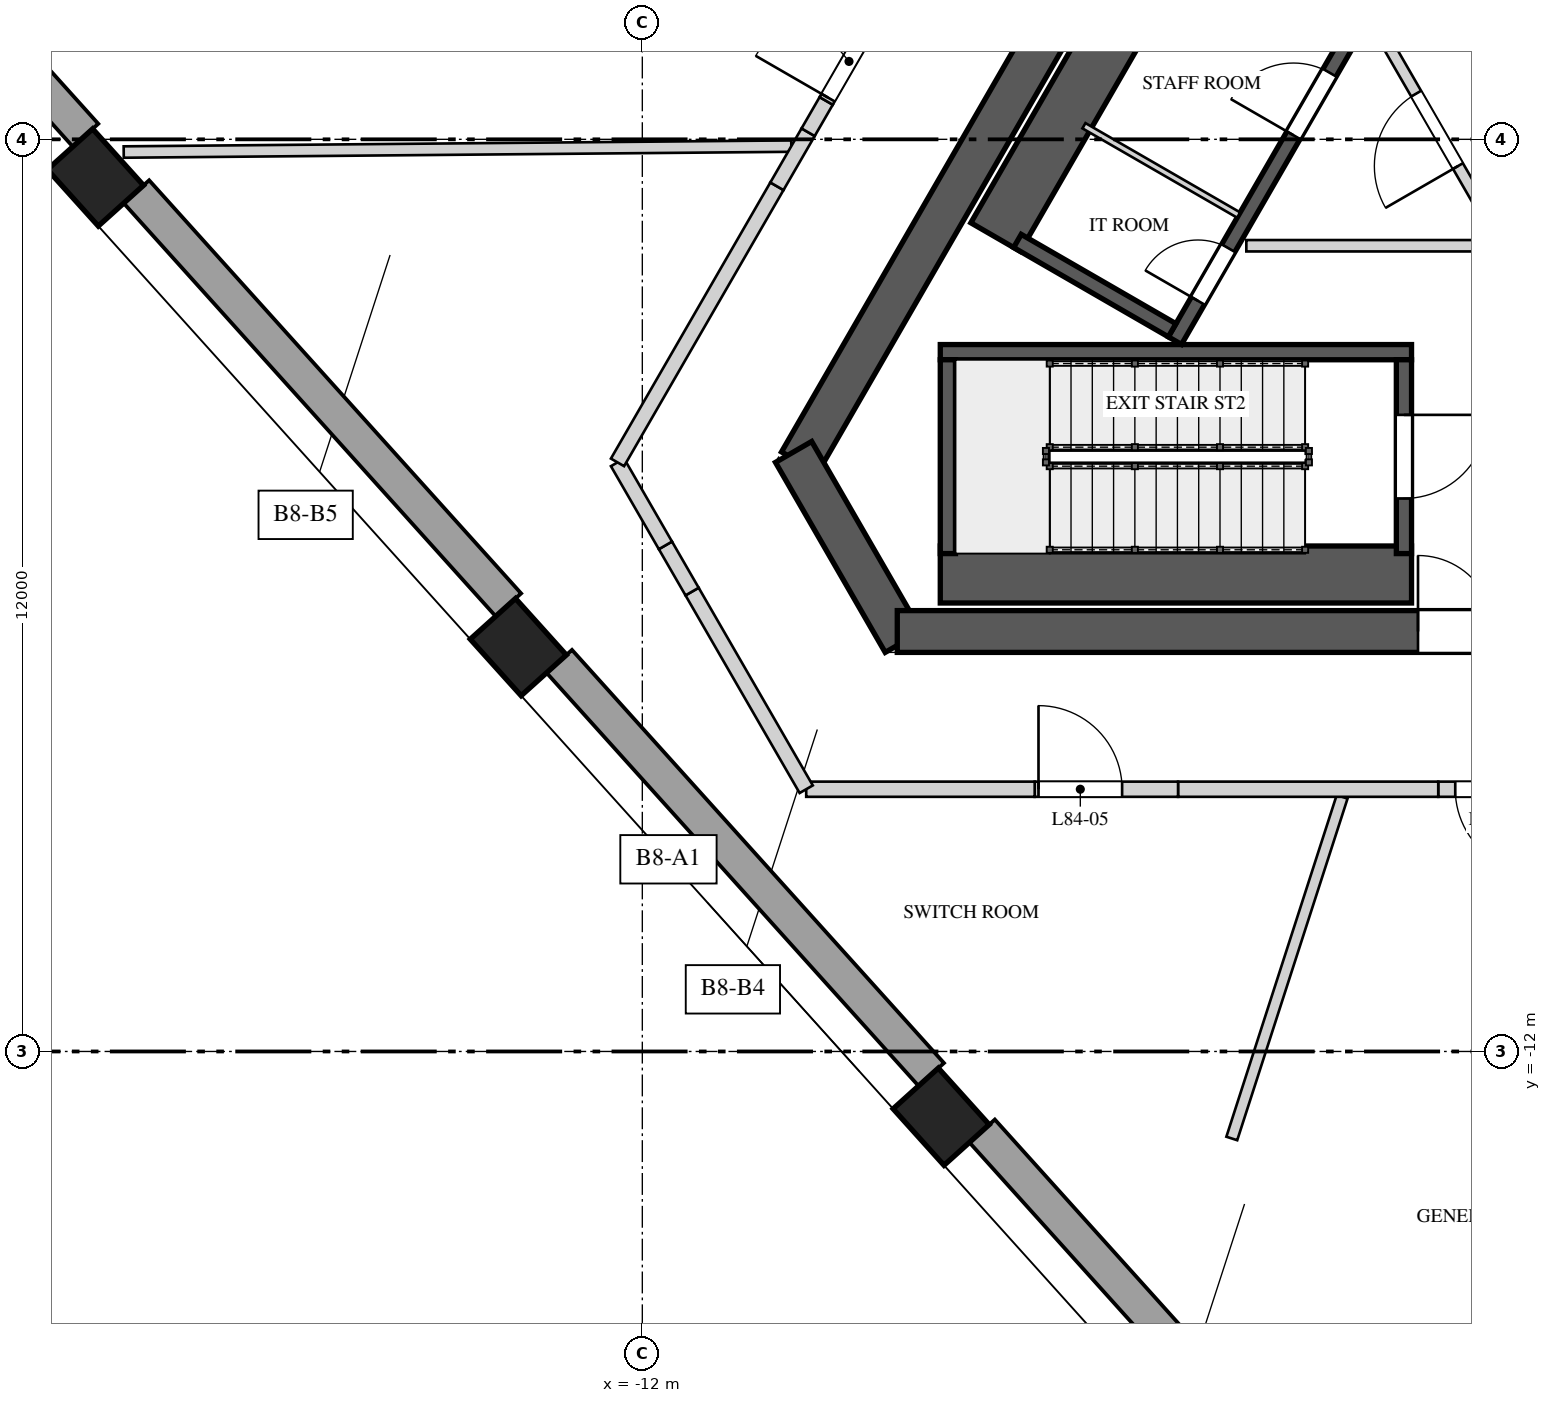
"""IFC4 building model, lengths in metres.
Left out: names, types, materials, properties, quantities, classifications, styles, units other than length and angle.
Written with IfcOpenShell. Run it as: python <this file> out.ifc"""

import sys

from ifc_helpers import new_model, si_unit, direction, frame, frame_2d, origin, origin_2d, place, context, subcontext, project, spatial, polyline, rectangle, outline, extrude, element, fill, save


model = new_model("IFC4")
c1 = context("Model", 3, precision=1e-05, world=origin(), true_north=direction((0.0, 1.0)))
c2 = subcontext(c1, "Body", "Model", "MODEL_VIEW")
j1 = project(units=[si_unit("LENGTHUNIT", "METRE"), si_unit("PLANEANGLEUNIT", "RADIAN")], contexts=[c1])
p1 = place(None, origin())
s1 = spatial("IfcSite", under=j1, at=p1, CompositionType="ELEMENT")
p2 = place(p1, origin())
s2 = spatial("IfcBuilding", under=s1, at=p2, CompositionType="ELEMENT")
p3 = place(p2, frame((0.0, 0.0, 365.9)))
s3 = spatial("IfcBuildingStorey", under=s2, at=p3, CompositionType="ELEMENT", Elevation=365.9)
p4 = place(p3, frame((-1.285, 10.725, 0.0), z_axis=(0.0, 0.0, 1.0), x_axis=(-0.499994590896, -0.86602852671, 0.0)))
e1 = element("IfcWall", 1, at=p4, inside=s3, PredefinedType="SHEAR", context=c2, shape_type="SweptSolid", body=[
    extrude(rectangle(XDim=17.292, YDim=0.55, at=frame_2d((8.646, 0.0))), origin(), (0.0, 0.0, 1.0), 4.5),
])
p5 = place(p4, frame((6.851, 0.0, 0.0)))
e2 = element("IfcOpeningElement", 2, at=p5, cuts=e1, PredefinedType="OPENING", context=c2, shape_type="SweptSolid", body=[
    extrude(rectangle(XDim=1.0, YDim=2.4, at=frame_2d((0.5, 1.2))), frame((0.0, 0.285, 0.0), z_axis=(0.0, -1.0, 0.0), x_axis=(1.0, 0.0, 0.0)), (0.0, 0.0, 1.0), 0.57),
])
p6 = place(p3, frame((-10.01, -4.113, 0.0), z_axis=(0.0, 0.0, 1.0), x_axis=(0.499995765644, -0.866027848477, 0.0)))
e3 = element("IfcWall", 3, at=p6, inside=s3, PredefinedType="SHEAR", context=c2, shape_type="SweptSolid", body=[
    extrude(rectangle(XDim=2.887, YDim=0.55, at=frame_2d((1.443, 0.0))), origin(), (0.0, 0.0, 1.0), 4.5),
])
p7 = place(p3, frame((-8.646, -6.475, 0.0), z_axis=(0.0, 0.0, 1.0), x_axis=(1.0, 0.0, 0.0)))
e4 = element("IfcWall", 4, at=p7, inside=s3, PredefinedType="SHEAR", context=c2, shape_type="SweptSolid", body=[
    extrude(rectangle(XDim=17.292, YDim=0.55, at=frame_2d((8.646, 0.0))), origin(), (0.0, 0.0, 1.0), 4.5),
])
p8 = place(p7, frame((6.851, 0.0, 0.0)))
e5 = element("IfcOpeningElement", 5, at=p8, cuts=e4, PredefinedType="OPENING", context=c2, shape_type="SweptSolid", body=[
    extrude(rectangle(XDim=1.0, YDim=2.4, at=frame_2d((0.5, 1.2))), frame((0.0, 0.285, 0.0), z_axis=(0.0, -1.0, 0.0), x_axis=(1.0, 0.0, 0.0)), (0.0, 0.0, 1.0), 0.57),
])
p9 = place(p7, frame((15.089, 0.0, 0.0)))
e6 = element("IfcOpeningElement", 6, at=p9, cuts=e4, PredefinedType="OPENING", context=c2, shape_type="SweptSolid", body=[
    extrude(rectangle(XDim=0.8, YDim=2.1, at=frame_2d((0.4, 1.05))), frame((0.0, 0.285, 0.0), z_axis=(0.0, -1.0, 0.0), x_axis=(1.0, 0.0, 0.0)), (0.0, 0.0, 1.0), 0.57),
])
for number, where, z_axis, x_axis in (
    (7, (-19.195, -0.502, 0.0), (0.0, 0.0, 1.0), (0.669, -0.743, 0.0)),
    (8, (-13.631, -6.68, 0.0), (0.0, 0.0, 1.0), (0.669, -0.743, 0.0)),
    (9, (-8.068, -12.858, 0.0), (0.0, 0.0, 1.0), (0.669, -0.743, 0.0)),
):
    element("IfcColumn", number, at=place(p3, frame(where, z_axis=z_axis, x_axis=x_axis)), inside=s3, PredefinedType="COLUMN", context=c2, shape_type="SweptSolid", body=[
        extrude(rectangle(XDim=1.0, YDim=0.8, at=origin_2d()), origin(), (0.0, 0.0, 1.0), 4.5),
    ])
p10 = place(p3, frame((-23.817, 5.043, 0.0), z_axis=(0.0, 0.0, 1.0), x_axis=(0.669137493687, -0.743138624041, 0.0)))
e10 = element("IfcWall", 10, at=p10, inside=s3, PredefinedType="SOLIDWALL", context=c2, shape_type="SweptSolid", body=[
    extrude(rectangle(XDim=6.714, YDim=0.45, at=frame_2d((3.357, 0.0))), origin(), (0.0, 0.0, 1.0), 3.8),
])
p11 = place(p3, frame((-18.656, -0.689, 0.0), z_axis=(0.0, 0.0, 1.0), x_axis=(0.669117789535, -0.743156365598, 0.0)))
e11 = element("IfcWall", 11, at=p11, inside=s3, PredefinedType="SOLIDWALL", context=c2, shape_type="SweptSolid", body=[
    extrude(rectangle(XDim=7.314, YDim=0.45, at=frame_2d((3.657, 0.0))), origin(), (0.0, 0.0, 1.0), 3.8),
])
p12 = place(p3, frame((-13.093, -6.868, 0.0), z_axis=(0.0, 0.0, 1.0), x_axis=(0.669136224502, -0.74313976684, 0.0)))
e12 = element("IfcWall", 12, at=p12, inside=s3, PredefinedType="SOLIDWALL", context=c2, shape_type="SweptSolid", body=[
    extrude(rectangle(XDim=7.314, YDim=0.45, at=frame_2d((3.657, 0.0))), origin(), (0.0, 0.0, 1.0), 3.8),
])
p13 = place(p3, frame((-7.53, -13.046, 0.0), z_axis=(0.0, 0.0, 1.0), x_axis=(0.669152823362, -0.743124820597, 0.0)))
e13 = element("IfcWall", 13, at=p13, inside=s3, PredefinedType="SOLIDWALL", context=c2, shape_type="SweptSolid", body=[
    extrude(rectangle(XDim=7.314, YDim=0.45, at=frame_2d((3.657, 0.0))), origin(), (0.0, 0.0, 1.0), 3.8),
])
p14 = place(p3, frame((-8.08, -5.725, 0.0), z_axis=(0.0, 0.0, 1.0), x_axis=(1.0, 0.0, 0.0)))
e14 = element("IfcWall", 14, at=p14, inside=s3, PredefinedType="SOLIDWALL", context=c2, shape_type="SweptSolid", body=[
    extrude(rectangle(XDim=6.2, YDim=0.75, at=frame_2d((3.1, 0.0))), origin(), (0.0, 0.0, 1.0), 4.15),
])
p15 = place(p3, frame((-8.08, -2.8, 0.0), z_axis=(0.0, 0.0, 1.0), x_axis=(1.0, 0.0, 0.0)))
e15 = element("IfcWall", 15, at=p15, inside=s3, PredefinedType="SOLIDWALL", context=c2, shape_type="SweptSolid", body=[
    extrude(rectangle(XDim=6.2, YDim=0.2, at=frame_2d((3.1, 0.0))), origin(), (0.0, 0.0, 1.0), 4.15),
])
p16 = place(p3, frame((-7.98, -2.9, 0.0), z_axis=(0.0, 0.0, 1.0), x_axis=(0.0, -1.0, 0.0)))
e16 = element("IfcWall", 16, at=p16, inside=s3, PredefinedType="SOLIDWALL", context=c2, shape_type="SweptSolid", body=[
    extrude(rectangle(XDim=2.55, YDim=0.2, at=frame_2d((1.275, 0.0))), origin(), (0.0, 0.0, 1.0), 4.15),
])
p17 = place(p3, frame((-1.98, -2.9, 0.0), z_axis=(0.0, 0.0, 1.0), x_axis=(0.0, -1.0, 0.0)))
e17 = element("IfcWall", 17, at=p17, inside=s3, PredefinedType="SOLIDWALL", context=c2, shape_type="SweptSolid", body=[
    extrude(rectangle(XDim=2.55, YDim=0.2, at=frame_2d((1.275, 0.0))), origin(), (0.0, 0.0, 1.0), 4.15),
])
p18 = place(p17, frame((0.725, 0.0, 0.0)))
e18 = element("IfcOpeningElement", 18, at=p18, cuts=e17, PredefinedType="OPENING", context=c2, shape_type="SweptSolid", body=[
    extrude(rectangle(XDim=1.1, YDim=2.4, at=frame_2d((0.55, 1.2))), frame((0.0, 0.11, 0.0), z_axis=(0.0, -1.0, 0.0), x_axis=(1.0, 0.0, 0.0)), (0.0, 0.0, 1.0), 0.22),
])
p19 = place(p3, frame((-4.993, -2.648, 0.0), z_axis=(0.0, 0.0, 1.0), x_axis=(0.499996545922, 0.866027397988, 0.0)))
e19 = element("IfcWall", 19, at=p19, inside=s3, PredefinedType="SOLIDWALL", context=c2, shape_type="SweptSolid", body=[
    extrude(rectangle(XDim=5.5, YDim=0.2, at=frame_2d((2.75, 0.0))), origin(), (0.0, 0.0, 1.0), 4.15),
])
p20 = place(p19, frame((3.12, 0.0, 0.0)))
e20 = element("IfcOpeningElement", 20, at=p20, cuts=e19, PredefinedType="OPENING", context=c2, shape_type="SweptSolid", body=[
    extrude(rectangle(XDim=0.95, YDim=2.4, at=frame_2d((0.475, 1.2))), frame((0.0, 0.11, 0.0), z_axis=(0.0, -1.0, 0.0), x_axis=(1.0, 0.0, 0.0)), (0.0, 0.0, 1.0), 0.22),
])
p21 = place(p19, frame((0.605, 0.0, 0.0)))
e21 = element("IfcOpeningElement", 21, at=p21, cuts=e19, PredefinedType="OPENING", context=c2, shape_type="SweptSolid", body=[
    extrude(rectangle(XDim=0.8, YDim=2.1, at=frame_2d((0.4, 1.05))), frame((0.0, 0.11, 0.0), z_axis=(0.0, -1.0, 0.0), x_axis=(1.0, 0.0, 0.0)), (0.0, 0.0, 1.0), 0.22),
])
p22 = place(p3, frame((-4.603, 3.477, 0.0), z_axis=(0.0, 0.0, 1.0), x_axis=(-0.500015767406, -0.866016300277, 0.0)))
e22 = element("IfcWall", 22, at=p22, inside=s3, PredefinedType="SOLIDWALL", context=c2, shape_type="SweptSolid", body=[
    extrude(rectangle(XDim=5.5, YDim=0.75, at=frame_2d((2.75, 0.0))), origin(), (0.0, 0.0, 1.0), 4.15),
])
p23 = place(p3, frame((-5.03, -2.512, 0.0), z_axis=(0.0, 0.0, 1.0), x_axis=(-0.866016039709, 0.500016218704, 0.0)))
e23 = element("IfcWall", 23, at=p23, inside=s3, PredefinedType="SOLIDWALL", context=c2, shape_type="SweptSolid", body=[
    extrude(rectangle(XDim=2.35, YDim=0.2, at=frame_2d((1.175, 0.0))), origin(), (0.0, 0.0, 1.0), 4.15),
])
p24 = place(p3, frame((-4.155, -0.996, 0.0), z_axis=(0.0, 0.0, 1.0), x_axis=(-0.866016039709, 0.500016218704, 0.0)))
e24 = element("IfcWall", 24, at=p24, inside=s3, PredefinedType="PARTITIONING", context=c2, shape_type="SweptSolid", body=[
    extrude(rectangle(XDim=2.35, YDim=0.08, at=frame_2d((1.175, 0.0))), origin(), (0.0, 0.0, 1.0), 4.15),
])
p25 = place(p3, frame((-0.744, -1.261, 0.0), z_axis=(0.0, 0.0, 1.0), x_axis=(-0.500004234368, 0.866022959057, 0.0)))
e25 = element("IfcWall", 25, at=p25, inside=s3, PredefinedType="PARTITIONING", context=c2, shape_type="SweptSolid", body=[
    extrude(rectangle(XDim=3.125, YDim=0.15, at=frame_2d((1.562, 0.0))), origin(), (0.0, 0.0, 1.0), 4.15),
])
p26 = place(p25, frame((1.05, 0.0, 0.0)))
e26 = element("IfcOpeningElement", 26, at=p26, cuts=e25, PredefinedType="OPENING", context=c2, shape_type="SweptSolid", body=[
    extrude(rectangle(XDim=1.1, YDim=2.4, at=frame_2d((0.55, 1.2))), frame((0.0, 0.085, 0.0), z_axis=(0.0, -1.0, 0.0), x_axis=(1.0, 0.0, 0.0)), (0.0, 0.0, 1.0), 0.17),
])
p27 = place(p3, frame((-4.053, -1.4, 0.0), z_axis=(0.0, 0.0, 1.0), x_axis=(1.0, 0.0, 0.0)))
e27 = element("IfcWall", 27, at=p27, inside=s3, PredefinedType="PARTITIONING", context=c2, shape_type="SweptSolid", body=[
    extrude(rectangle(XDim=7.876, YDim=0.15, at=frame_2d((3.938, 0.0))), origin(), (0.0, 0.0, 1.0), 4.15),
])
p28 = place(p3, frame((-10.04, -0.089, 0.0), z_axis=(0.0, 0.0, 1.0), x_axis=(-0.999960441248, -0.00889471414, 0.0)))
e28 = element("IfcWall", 28, at=p28, inside=s3, PredefinedType="PARTITIONING", context=c2, shape_type="SweptSolid", body=[
    extrude(rectangle(XDim=8.783, YDim=0.15, at=frame_2d((4.392, 0.0))), origin(), (0.0, 0.0, 1.0), 3.45),
])
p29 = place(p3, frame((-2.793, -8.65, 0.0), z_axis=(0.0, 0.0, 1.0), x_axis=(-0.307297266893, -0.951613571656, 0.0)))
e29 = element("IfcWall", 29, at=p29, inside=s3, PredefinedType="PARTITIONING", context=c2, shape_type="SweptSolid", body=[
    extrude(rectangle(XDim=4.723, YDim=0.15, at=frame_2d((2.362, 0.0))), origin(), (0.0, 0.0, 1.0), 4.15),
])
p30 = place(p3, frame((-0.155, -8.55, 0.0), z_axis=(0.0, 0.0, 1.0), x_axis=(-1.0, 0.0, 0.0)))
e30 = element("IfcWall", 30, at=p30, inside=s3, PredefinedType="SOLIDWALL", context=c2, shape_type="SweptSolid", body=[
    extrude(outline(polyline([(0.0, 0.0), (1.374, 0.0), (1.374, 3.25), (0.567, 3.25), (0.567, 4.15), (0.0, 4.15), (0.0, 0.0)])), frame((0.0, 0.1, 0.0), z_axis=(0.0, -1.0, 0.0), x_axis=(1.0, 0.0, 0.0)), (0.0, 0.0, 1.0), 0.2),
])
p31 = place(p30, frame((0.05, 0.0, 0.0)))
e31 = element("IfcOpeningElement", 31, at=p31, cuts=e30, PredefinedType="OPENING", context=c2, shape_type="SweptSolid", body=[
    extrude(rectangle(XDim=1.1, YDim=2.4, at=frame_2d((0.55, 1.2))), frame((0.0, 0.11, 0.0), z_axis=(0.0, -1.0, 0.0), x_axis=(1.0, 0.0, 0.0)), (0.0, 0.0, 1.0), 0.22),
])
p32 = place(p3, frame((-1.529, -8.55, 0.0), z_axis=(0.0, 0.0, 1.0), x_axis=(-1.0, 0.0, 0.0)))
e32 = element("IfcWall", 32, at=p32, inside=s3, PredefinedType="SOLIDWALL", context=c2, shape_type="SweptSolid", body=[
    extrude(rectangle(XDim=3.423, YDim=0.2, at=frame_2d((1.711, 0.0))), origin(), (0.0, 0.0, 1.0), 4.15),
])
p33 = place(p3, frame((-6.838, -8.55, 0.0), z_axis=(0.0, 0.0, 1.0), x_axis=(1.0, 0.0, 0.0)))
e33 = element("IfcWall", 33, at=p33, inside=s3, PredefinedType="SOLIDWALL", context=c2, shape_type="SweptSolid", body=[
    extrude(outline(polyline([(0.0, 0.0), (1.886, 0.0), (1.886, 3.45), (1.06, 3.45), (1.06, 4.15), (0.0, 4.15), (0.0, 0.0)])), frame((0.0, 0.1, 0.0), z_axis=(0.0, -1.0, 0.0), x_axis=(1.0, 0.0, 0.0)), (0.0, 0.0, 1.0), 0.2),
])
p34 = place(p33, frame((0.05, 0.0, 0.0)))
e34 = element("IfcOpeningElement", 34, at=p34, cuts=e33, PredefinedType="OPENING", context=c2, shape_type="SweptSolid", body=[
    extrude(rectangle(XDim=1.1, YDim=2.4, at=frame_2d((0.55, 1.2))), frame((0.0, 0.11, 0.0), z_axis=(0.0, -1.0, 0.0), x_axis=(1.0, 0.0, 0.0)), (0.0, 0.0, 1.0), 0.22),
])
p35 = place(p3, frame((-6.838, -8.55, 0.0), z_axis=(0.0, 0.0, 1.0), x_axis=(-1.0, 0.0, 0.0)))
e35 = element("IfcWall", 35, at=p35, inside=s3, PredefinedType="SOLIDWALL", context=c2, shape_type="SweptSolid", body=[
    extrude(rectangle(XDim=3.006, YDim=0.2, at=frame_2d((1.503, 0.0))), origin(), (0.0, 0.0, 1.0), 4.15),
])
p36 = place(p3, frame((-9.844, -8.55, 0.0), z_axis=(0.0, 0.0, 1.0), x_axis=(-0.500003959331, 0.866023117852, 0.0)))
e36 = element("IfcWall", 36, at=p36, inside=s3, PredefinedType="SOLIDWALL", context=c2, shape_type="SweptSolid", body=[
    extrude(rectangle(XDim=3.003, YDim=0.2, at=frame_2d((1.501, 0.0))), origin(), (0.0, 0.0, 1.0), 4.15),
])
p37 = place(p3, frame((-11.345, -5.949, 0.0), z_axis=(0.0, 0.0, 1.0), x_axis=(-0.499993523031, 0.866029143232, 0.0)))
e37 = element("IfcWall", 37, at=p37, inside=s3, PredefinedType="SOLIDWALL", context=c2, shape_type="SweptSolid", body=[
    extrude(rectangle(XDim=0.702, YDim=0.2, at=frame_2d((0.351, 0.0))), origin(), (0.0, 0.0, 1.0), 3.45),
])
p38 = place(p3, frame((-11.696, -5.342, 0.0), z_axis=(0.0, 0.0, 1.0), x_axis=(-0.500013012896, 0.866017890655, 0.0)))
e38 = element("IfcWall", 38, at=p38, inside=s3, PredefinedType="SOLIDWALL", context=c2, shape_type="SweptSolid", body=[
    extrude(rectangle(XDim=1.261, YDim=0.2, at=frame_2d((0.63, 0.0))), origin(), (0.0, 0.0, 1.0), 4.15),
])
p39 = place(p3, frame((-12.326, -4.25, 0.0), z_axis=(0.0, 0.0, 1.0), x_axis=(0.499982771656, 0.866035350345, 0.0)))
e39 = element("IfcWall", 39, at=p39, inside=s3, PredefinedType="SOLIDWALL", context=c2, shape_type="SweptSolid", body=[
    extrude(rectangle(XDim=4.195, YDim=0.2, at=frame_2d((2.097, 0.0))), origin(), (0.0, 0.0, 1.0), 4.15),
])
p40 = place(p3, frame((-10.229, -0.617, 0.0), z_axis=(0.0, 0.0, 1.0), x_axis=(0.5001686003, 0.865928040471, 0.0)))
e40 = element("IfcWall", 40, at=p40, inside=s3, PredefinedType="SOLIDWALL", context=c2, shape_type="SweptSolid", body=[
    extrude(rectangle(XDim=0.821, YDim=0.2, at=frame_2d((0.411, 0.0))), origin(), (0.0, 0.0, 1.0), 3.45),
])
p41 = place(p3, frame((-9.819, 0.094, 0.0), z_axis=(0.0, 0.0, 1.0), x_axis=(0.500003887042, 0.866023159588, 0.0)))
e41 = element("IfcWall", 41, at=p41, inside=s3, PredefinedType="SOLIDWALL", context=c2, shape_type="SweptSolid", body=[
    extrude(rectangle(XDim=0.476, YDim=0.2, at=frame_2d((0.238, 0.0))), origin(), (0.0, 0.0, 1.0), 4.15),
])
p42 = place(p3, frame((-9.581, 0.505, 0.0), z_axis=(0.0, 0.0, 1.0), x_axis=(0.499984515995, 0.866034343295, 0.0)))
e42 = element("IfcWall", 42, at=p42, inside=s3, PredefinedType="SOLIDWALL", context=c2, shape_type="SweptSolid", body=[
    extrude(outline(polyline([(0.0, 0.0), (2.124, 0.0), (2.124, 3.05), (1.18, 3.05), (1.18, 4.15), (0.0, 4.15), (0.0, 0.0)])), frame((0.0, 0.1, 0.0), z_axis=(0.0, -1.0, 0.0), x_axis=(1.0, 0.0, 0.0)), (0.0, 0.0, 1.0), 0.2),
])
p43 = place(p42, frame((0.05, 0.0, 0.0)))
e43 = element("IfcOpeningElement", 43, at=p43, cuts=e42, PredefinedType="OPENING", context=c2, shape_type="SweptSolid", body=[
    extrude(rectangle(XDim=1.1, YDim=2.4, at=frame_2d((0.55, 1.2))), frame((0.0, 0.11, 0.0), z_axis=(0.0, -1.0, 0.0), x_axis=(1.0, 0.0, 0.0)), (0.0, 0.0, 1.0), 0.22),
])
p44 = place(p18, origin())
e44 = element("IfcDoor", 44, at=p44, inside=s3, OperationType="SINGLE_SWING_LEFT", PredefinedType="DOOR", context=c2, shape_type="SweptSolid", body=[
    extrude(rectangle(XDim=1.1, YDim=2.4, at=frame_2d((0.55, 1.2))), frame((0.0, 0.025, 0.0), z_axis=(0.0, -1.0, 0.0), x_axis=(1.0, 0.0, 0.0)), (0.0, 0.0, 1.0), 0.05),
])
fill(e18, e44)
p45 = place(p20, origin())
e45 = element("IfcDoor", 45, at=p45, inside=s3, OperationType="SINGLE_SWING_LEFT", PredefinedType="DOOR", context=c2, shape_type="SweptSolid", body=[
    extrude(rectangle(XDim=0.95, YDim=2.4, at=frame_2d((0.475, 1.2))), frame((0.0, 0.025, 0.0), z_axis=(0.0, -1.0, 0.0), x_axis=(1.0, 0.0, 0.0)), (0.0, 0.0, 1.0), 0.05),
])
fill(e20, e45)
p46 = place(p21, origin())
e46 = element("IfcDoor", 46, at=p46, inside=s3, OperationType="SINGLE_SWING_RIGHT", PredefinedType="DOOR", context=c2, shape_type="SweptSolid", body=[
    extrude(rectangle(XDim=0.8, YDim=2.1, at=frame_2d((0.4, 1.05))), frame((0.0, 0.025, 0.0), z_axis=(0.0, -1.0, 0.0), x_axis=(1.0, 0.0, 0.0)), (0.0, 0.0, 1.0), 0.05),
])
fill(e21, e46)
p47 = place(p26, origin())
e47 = element("IfcDoor", 47, at=p47, inside=s3, OperationType="SINGLE_SWING_LEFT", PredefinedType="DOOR", context=c2, shape_type="SweptSolid", body=[
    extrude(rectangle(XDim=1.1, YDim=2.4, at=frame_2d((0.55, 1.2))), frame((0.0, 0.025, 0.0), z_axis=(0.0, -1.0, 0.0), x_axis=(1.0, 0.0, 0.0)), (0.0, 0.0, 1.0), 0.05),
])
fill(e26, e47)
p48 = place(p8, origin())
e48 = element("IfcDoor", 48, at=p48, inside=s3, OperationType="SINGLE_SWING_LEFT", PredefinedType="DOOR", context=c2, shape_type="SweptSolid", body=[
    extrude(rectangle(XDim=1.0, YDim=2.4, at=frame_2d((0.5, 1.2))), frame((0.0, 0.025, 0.0), z_axis=(0.0, -1.0, 0.0), x_axis=(1.0, 0.0, 0.0)), (0.0, 0.0, 1.0), 0.05),
])
fill(e5, e48)
p49 = place(p43, origin())
e49 = element("IfcDoor", 49, at=p49, inside=s3, OperationType="SINGLE_SWING_RIGHT", PredefinedType="DOOR", context=c2, shape_type="SweptSolid", body=[
    extrude(rectangle(XDim=1.1, YDim=2.4, at=frame_2d((0.55, 1.2))), frame((0.0, 0.025, 0.0), z_axis=(0.0, -1.0, 0.0), x_axis=(1.0, 0.0, 0.0)), (0.0, 0.0, 1.0), 0.05),
])
fill(e43, e49)
p50 = place(p34, origin())
e50 = element("IfcDoor", 50, at=p50, inside=s3, OperationType="SINGLE_SWING_LEFT", PredefinedType="DOOR", context=c2, shape_type="SweptSolid", body=[
    extrude(rectangle(XDim=1.1, YDim=2.4, at=frame_2d((0.55, 1.2))), frame((0.0, 0.025, 0.0), z_axis=(0.0, -1.0, 0.0), x_axis=(1.0, 0.0, 0.0)), (0.0, 0.0, 1.0), 0.05),
])
fill(e34, e50)
p51 = place(p31, origin())
e51 = element("IfcDoor", 51, at=p51, inside=s3, OperationType="SINGLE_SWING_RIGHT", PredefinedType="DOOR", context=c2, shape_type="SweptSolid", body=[
    extrude(rectangle(XDim=1.1, YDim=2.4, at=frame_2d((0.55, 1.2))), frame((0.0, 0.025, 0.0), z_axis=(0.0, -1.0, 0.0), x_axis=(1.0, 0.0, 0.0)), (0.0, 0.0, 1.0), 0.05),
])
fill(e31, e51)
save(model, sys.argv[1])
